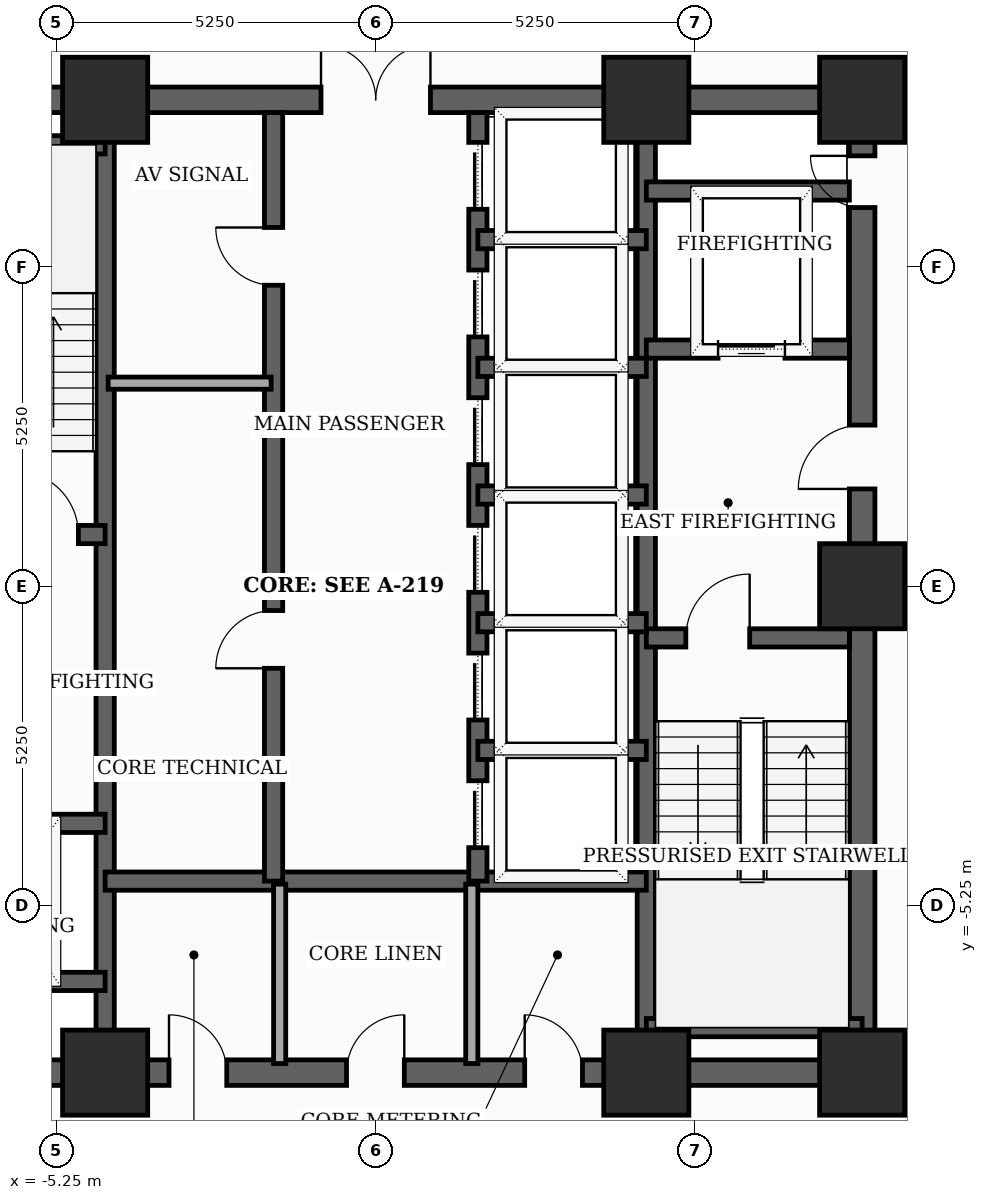
"""IFC4 building model, lengths in metres.
Left out: names, types, materials, properties, quantities, classifications, styles, units other than length and angle.
Written with IfcOpenShell. Run it as: python <this file> out.ifc"""

import sys

from ifc_helpers import new_model, si_unit, direction, frame, frame_2d, origin, origin_2d, place, context, subcontext, project, spatial, rectangle, extrude, element, fill, save


model = new_model("IFC4")
c1 = context("Model", 3, precision=1e-05, world=origin(), true_north=direction((0.0, 1.0)))
c2 = subcontext(c1, "Body", "Model", "MODEL_VIEW")
j1 = project(units=[si_unit("LENGTHUNIT", "METRE"), si_unit("PLANEANGLEUNIT", "RADIAN")], contexts=[c1])
p1 = place(None, origin())
s1 = spatial("IfcSite", under=j1, at=p1, CompositionType="ELEMENT")
p2 = place(p1, origin())
s2 = spatial("IfcBuilding", under=s1, at=p2, CompositionType="ELEMENT")
p3 = place(p2, frame((0.0, 0.0, 173.1)))
s3 = spatial("IfcBuildingStorey", under=s2, at=p3, CompositionType="ELEMENT", Elevation=173.1)
for number, where, z_axis, x_axis in (
    (1, (-4.45, -8.0, 0.0), (0.0, 0.0, 1.0), (1.0, 0.0, 0.0)),
    (2, (4.45, -8.0, 0.0), (0.0, 0.0, 1.0), (1.0, 0.0, 0.0)),
    (3, (8.0, -8.0, 0.0), (0.0, 0.0, 1.0), (1.0, 0.0, 0.0)),
    (4, (8.0, 0.0, 0.0), (0.0, 0.0, 1.0), (1.0, 0.0, 0.0)),
    (5, (8.0, 8.0, 0.0), (0.0, 0.0, 1.0), (1.0, 0.0, 0.0)),
    (6, (4.45, 8.0, 0.0), (0.0, 0.0, 1.0), (1.0, 0.0, 0.0)),
    (7, (-4.45, 8.0, 0.0), (0.0, 0.0, 1.0), (1.0, 0.0, 0.0)),
):
    element("IfcColumn", number, at=place(p3, frame(where, z_axis=z_axis, x_axis=x_axis)), inside=s3, PredefinedType="COLUMN", context=c2, shape_type="SweptSolid", body=[
        extrude(rectangle(XDim=1.4, YDim=1.4, at=origin_2d()), origin(), (0.0, 0.0, 1.0), 3.7),
    ])
p4 = place(p3, frame((8.0, -8.0, 0.0), z_axis=(0.0, 0.0, 1.0), x_axis=(0.0, 1.0, 0.0)))
e8 = element("IfcWall", 8, at=p4, inside=s3, PredefinedType="SHEAR", context=c2, shape_type="SweptSolid", body=[
    extrude(rectangle(XDim=16.0, YDim=0.42, at=frame_2d((8.0, 0.0))), origin(), (0.0, 0.0, 1.0), 3.5),
])
p5 = place(p4, frame((9.6, 0.0, 0.0)))
e9 = element("IfcOpeningElement", 9, at=p5, cuts=e8, PredefinedType="OPENING", context=c2, shape_type="SweptSolid", body=[
    extrude(rectangle(XDim=1.05, YDim=2.15, at=frame_2d((0.525, 1.075))), frame((0.0, 0.22, 0.0), z_axis=(0.0, -1.0, 0.0), x_axis=(1.0, 0.0, 0.0)), (0.0, 0.0, 1.0), 0.44),
])
p6 = place(p4, frame((14.229, 0.0, 0.0)))
e10 = element("IfcOpeningElement", 10, at=p6, cuts=e8, PredefinedType="OPENING", context=c2, shape_type="SweptSolid", body=[
    extrude(rectangle(XDim=0.85, YDim=2.02, at=frame_2d((0.425, 1.01))), frame((0.0, 0.22, 0.0), z_axis=(0.0, -1.0, 0.0), x_axis=(1.0, 0.0, 0.0)), (0.0, 0.0, 1.0), 0.44),
])
p7 = place(p3, frame((-8.0, -8.0, 0.0), z_axis=(0.0, 0.0, 1.0), x_axis=(1.0, 0.0, 0.0)))
e11 = element("IfcWall", 11, at=p7, inside=s3, PredefinedType="SHEAR", context=c2, shape_type="SweptSolid", body=[
    extrude(rectangle(XDim=16.0, YDim=0.42, at=frame_2d((8.0, 0.0))), origin(), (0.0, 0.0, 1.0), 3.5),
])
p8 = place(p7, frame((4.6, 0.0, 0.0)))
e12 = element("IfcOpeningElement", 12, at=p8, cuts=e11, PredefinedType="OPENING", context=c2, shape_type="SweptSolid", body=[
    extrude(rectangle(XDim=0.95, YDim=2.1, at=frame_2d((0.475, 1.05))), frame((0.0, 0.22, 0.0), z_axis=(0.0, -1.0, 0.0), x_axis=(1.0, 0.0, 0.0)), (0.0, 0.0, 1.0), 0.44),
])
p9 = place(p7, frame((7.52, 0.0, 0.0)))
e13 = element("IfcOpeningElement", 13, at=p9, cuts=e11, PredefinedType="OPENING", context=c2, shape_type="SweptSolid", body=[
    extrude(rectangle(XDim=0.95, YDim=2.1, at=frame_2d((0.475, 1.05))), frame((0.0, 0.22, 0.0), z_axis=(0.0, -1.0, 0.0), x_axis=(1.0, 0.0, 0.0)), (0.0, 0.0, 1.0), 0.44),
])
p10 = place(p7, frame((10.45, 0.0, 0.0)))
e14 = element("IfcOpeningElement", 14, at=p10, cuts=e11, PredefinedType="OPENING", context=c2, shape_type="SweptSolid", body=[
    extrude(rectangle(XDim=0.95, YDim=2.1, at=frame_2d((0.475, 1.05))), frame((0.0, 0.22, 0.0), z_axis=(0.0, -1.0, 0.0), x_axis=(1.0, 0.0, 0.0)), (0.0, 0.0, 1.0), 0.44),
])
p11 = place(p3, frame((-8.0, 8.0, 0.0), z_axis=(0.0, 0.0, 1.0), x_axis=(1.0, 0.0, 0.0)))
e15 = element("IfcWall", 15, at=p11, inside=s3, PredefinedType="SHEAR", context=c2, shape_type="SweptSolid", body=[
    extrude(rectangle(XDim=16.0, YDim=0.42, at=frame_2d((8.0, 0.0))), origin(), (0.0, 0.0, 1.0), 3.5),
])
p12 = place(p11, frame((7.1, 0.0, 0.0)))
e16 = element("IfcOpeningElement", 16, at=p12, cuts=e15, PredefinedType="OPENING", context=c2, shape_type="SweptSolid", body=[
    extrude(rectangle(XDim=1.8, YDim=2.15, at=frame_2d((0.9, 1.075))), frame((0.0, 0.22, 0.0), z_axis=(0.0, -1.0, 0.0), x_axis=(1.0, 0.0, 0.0)), (0.0, 0.0, 1.0), 0.44),
])
for number, where, z_axis, x_axis in (
    (17, (-4.45, -7.79, 0.0), (0.0, 0.0, 1.0), (0.0, 1.0, 0.0)),
    (18, (4.45, -7.79, 0.0), (0.0, 0.0, 1.0), (0.0, 1.0, 0.0)),
):
    element("IfcWall", number, at=place(p3, frame(where, z_axis=z_axis, x_axis=x_axis)), inside=s3, PredefinedType="SHEAR", context=c2, shape_type="SweptSolid", body=[
        extrude(rectangle(XDim=15.58, YDim=0.3, at=frame_2d((7.79, 0.0))), origin(), (0.0, 0.0, 1.0), 3.5),
    ])
p13 = place(p3, frame((-7.79, 0.85, 0.0), z_axis=(0.0, 0.0, 1.0), x_axis=(1.0, 0.0, 0.0)))
e19 = element("IfcWall", 19, at=p13, inside=s3, PredefinedType="SHEAR", context=c2, shape_type="SweptSolid", body=[
    extrude(rectangle(XDim=3.34, YDim=0.3, at=frame_2d((1.67, 0.0))), origin(), (0.0, 0.0, 1.0), 3.5),
])
p14 = place(p13, frame((1.85, 0.0, 0.0)))
e20 = element("IfcOpeningElement", 20, at=p14, cuts=e19, PredefinedType="OPENING", context=c2, shape_type="SweptSolid", body=[
    extrude(rectangle(XDim=1.05, YDim=2.15, at=frame_2d((0.525, 1.075))), frame((0.0, 0.16, 0.0), z_axis=(0.0, -1.0, 0.0), x_axis=(1.0, 0.0, 0.0)), (0.0, 0.0, 1.0), 0.32),
])
p15 = place(p3, frame((-7.79, 7.26, 0.0), z_axis=(0.0, 0.0, 1.0), x_axis=(1.0, 0.0, 0.0)))
e21 = element("IfcWall", 21, at=p15, inside=s3, PredefinedType="SHEAR", context=c2, shape_type="SweptSolid", body=[
    extrude(rectangle(XDim=3.34, YDim=0.3, at=frame_2d((1.67, 0.0))), origin(), (0.0, 0.0, 1.0), 3.5),
])
p16 = place(p3, frame((4.45, -0.85, 0.0), z_axis=(0.0, 0.0, 1.0), x_axis=(1.0, 0.0, 0.0)))
e22 = element("IfcWall", 22, at=p16, inside=s3, PredefinedType="SHEAR", context=c2, shape_type="SweptSolid", body=[
    extrude(rectangle(XDim=3.34, YDim=0.3, at=frame_2d((1.67, 0.0))), origin(), (0.0, 0.0, 1.0), 3.5),
])
p17 = place(p16, frame((0.65, 0.0, 0.0)))
e23 = element("IfcOpeningElement", 23, at=p17, cuts=e22, PredefinedType="OPENING", context=c2, shape_type="SweptSolid", body=[
    extrude(rectangle(XDim=1.05, YDim=2.15, at=frame_2d((0.525, 1.075))), frame((0.0, 0.16, 0.0), z_axis=(0.0, -1.0, 0.0), x_axis=(1.0, 0.0, 0.0)), (0.0, 0.0, 1.0), 0.32),
])
p18 = place(p3, frame((4.45, -7.26, 0.0), z_axis=(0.0, 0.0, 1.0), x_axis=(1.0, 0.0, 0.0)))
e24 = element("IfcWall", 24, at=p18, inside=s3, PredefinedType="SHEAR", context=c2, shape_type="SweptSolid", body=[
    extrude(rectangle(XDim=3.55, YDim=0.3, at=frame_2d((1.775, 0.0))), origin(), (0.0, 0.0, 1.0), 3.5),
])
p19 = place(p3, frame((-7.79, -3.9, 0.0), z_axis=(0.0, 0.0, 1.0), x_axis=(1.0, 0.0, 0.0)))
e25 = element("IfcWall", 25, at=p19, inside=s3, PredefinedType="SHEAR", context=c2, shape_type="SweptSolid", body=[
    extrude(rectangle(XDim=3.34, YDim=0.3, at=frame_2d((1.67, 0.0))), origin(), (0.0, 0.0, 1.0), 3.5),
])
p20 = place(p19, frame((1.27, 0.0, 0.0)))
e26 = element("IfcOpeningElement", 26, at=p20, cuts=e25, PredefinedType="OPENING", context=c2, shape_type="SweptSolid", body=[
    extrude(rectangle(XDim=1.1, YDim=2.1, at=frame_2d((0.55, 1.05))), frame((0.0, 0.16, 0.0), z_axis=(0.0, -1.0, 0.0), x_axis=(1.0, 0.0, 0.0)), (0.0, 0.0, 1.0), 0.32),
])
p21 = place(p3, frame((-7.79, -6.5, 0.0), z_axis=(0.0, 0.0, 1.0), x_axis=(1.0, 0.0, 0.0)))
e27 = element("IfcWall", 27, at=p21, inside=s3, PredefinedType="SHEAR", context=c2, shape_type="SweptSolid", body=[
    extrude(rectangle(XDim=3.34, YDim=0.3, at=frame_2d((1.67, 0.0))), origin(), (0.0, 0.0, 1.0), 3.5),
])
p22 = place(p3, frame((4.45, 3.9, 0.0), z_axis=(0.0, 0.0, 1.0), x_axis=(1.0, 0.0, 0.0)))
e28 = element("IfcWall", 28, at=p22, inside=s3, PredefinedType="SHEAR", context=c2, shape_type="SweptSolid", body=[
    extrude(rectangle(XDim=3.34, YDim=0.3, at=frame_2d((1.67, 0.0))), origin(), (0.0, 0.0, 1.0), 3.5),
])
p23 = place(p22, frame((1.18, 0.0, 0.0)))
e29 = element("IfcOpeningElement", 29, at=p23, cuts=e28, PredefinedType="OPENING", context=c2, shape_type="SweptSolid", body=[
    extrude(rectangle(XDim=1.1, YDim=2.1, at=frame_2d((0.55, 1.05))), frame((0.0, 0.16, 0.0), z_axis=(0.0, -1.0, 0.0), x_axis=(1.0, 0.0, 0.0)), (0.0, 0.0, 1.0), 0.32),
])
p24 = place(p3, frame((4.45, 6.5, 0.0), z_axis=(0.0, 0.0, 1.0), x_axis=(1.0, 0.0, 0.0)))
e30 = element("IfcWall", 30, at=p24, inside=s3, PredefinedType="SHEAR", context=c2, shape_type="SweptSolid", body=[
    extrude(rectangle(XDim=3.34, YDim=0.3, at=frame_2d((1.67, 0.0))), origin(), (0.0, 0.0, 1.0), 3.5),
])
p25 = place(p3, frame((-4.45, -4.85, 0.0), z_axis=(0.0, 0.0, 1.0), x_axis=(1.0, 0.0, 0.0)))
e31 = element("IfcWall", 31, at=p25, inside=s3, PredefinedType="SHEAR", context=c2, shape_type="SweptSolid", body=[
    extrude(rectangle(XDim=8.9, YDim=0.3, at=frame_2d((4.45, 0.0))), origin(), (0.0, 0.0, 1.0), 3.5),
])
p26 = place(p3, frame((-1.68, -4.85, 0.0), z_axis=(0.0, 0.0, 1.0), x_axis=(0.0, 1.0, 0.0)))
e32 = element("IfcWall", 32, at=p26, inside=s3, PredefinedType="SHEAR", context=c2, shape_type="SweptSolid", body=[
    extrude(rectangle(XDim=12.64, YDim=0.3, at=frame_2d((6.32, 0.0))), origin(), (0.0, 0.0, 1.0), 3.5),
])
p27 = place(p26, frame((3.5, 0.0, 0.0)))
e33 = element("IfcOpeningElement", 33, at=p27, cuts=e32, PredefinedType="OPENING", context=c2, shape_type="SweptSolid", body=[
    extrude(rectangle(XDim=0.95, YDim=2.1, at=frame_2d((0.475, 1.05))), frame((0.0, 0.16, 0.0), z_axis=(0.0, -1.0, 0.0), x_axis=(1.0, 0.0, 0.0)), (0.0, 0.0, 1.0), 0.32),
])
p28 = place(p26, frame((9.8, 0.0, 0.0)))
e34 = element("IfcOpeningElement", 34, at=p28, cuts=e32, PredefinedType="OPENING", context=c2, shape_type="SweptSolid", body=[
    extrude(rectangle(XDim=0.95, YDim=2.1, at=frame_2d((0.475, 1.05))), frame((0.0, 0.16, 0.0), z_axis=(0.0, -1.0, 0.0), x_axis=(1.0, 0.0, 0.0)), (0.0, 0.0, 1.0), 0.32),
])
p29 = place(p3, frame((1.68, -4.85, 0.0), z_axis=(0.0, 0.0, 1.0), x_axis=(0.0, 1.0, 0.0)))
e35 = element("IfcWall", 35, at=p29, inside=s3, PredefinedType="SHEAR", context=c2, shape_type="SweptSolid", body=[
    extrude(rectangle(XDim=12.64, YDim=0.3, at=frame_2d((6.32, 0.0))), origin(), (0.0, 0.0, 1.0), 3.5),
])
p30 = place(p29, frame((0.55, 0.0, 0.0)))
e36 = element("IfcOpeningElement", 36, at=p30, cuts=e35, PredefinedType="OPENING", context=c2, shape_type="SweptSolid", body=[
    extrude(rectangle(XDim=1.1, YDim=2.1, at=frame_2d((0.55, 1.05))), frame((0.0, 0.16, 0.0), z_axis=(0.0, -1.0, 0.0), x_axis=(1.0, 0.0, 0.0)), (0.0, 0.0, 1.0), 0.32),
])
p31 = place(p29, frame((2.65, 0.0, 0.0)))
e37 = element("IfcOpeningElement", 37, at=p31, cuts=e35, PredefinedType="OPENING", context=c2, shape_type="SweptSolid", body=[
    extrude(rectangle(XDim=1.1, YDim=2.1, at=frame_2d((0.55, 1.05))), frame((0.0, 0.16, 0.0), z_axis=(0.0, -1.0, 0.0), x_axis=(1.0, 0.0, 0.0)), (0.0, 0.0, 1.0), 0.32),
])
p32 = place(p29, frame((4.75, 0.0, 0.0)))
e38 = element("IfcOpeningElement", 38, at=p32, cuts=e35, PredefinedType="OPENING", context=c2, shape_type="SweptSolid", body=[
    extrude(rectangle(XDim=1.1, YDim=2.1, at=frame_2d((0.55, 1.05))), frame((0.0, 0.16, 0.0), z_axis=(0.0, -1.0, 0.0), x_axis=(1.0, 0.0, 0.0)), (0.0, 0.0, 1.0), 0.32),
])
p33 = place(p29, frame((6.85, 0.0, 0.0)))
e39 = element("IfcOpeningElement", 39, at=p33, cuts=e35, PredefinedType="OPENING", context=c2, shape_type="SweptSolid", body=[
    extrude(rectangle(XDim=1.1, YDim=2.1, at=frame_2d((0.55, 1.05))), frame((0.0, 0.16, 0.0), z_axis=(0.0, -1.0, 0.0), x_axis=(1.0, 0.0, 0.0)), (0.0, 0.0, 1.0), 0.32),
])
p34 = place(p29, frame((8.95, 0.0, 0.0)))
e40 = element("IfcOpeningElement", 40, at=p34, cuts=e35, PredefinedType="OPENING", context=c2, shape_type="SweptSolid", body=[
    extrude(rectangle(XDim=1.1, YDim=2.1, at=frame_2d((0.55, 1.05))), frame((0.0, 0.16, 0.0), z_axis=(0.0, -1.0, 0.0), x_axis=(1.0, 0.0, 0.0)), (0.0, 0.0, 1.0), 0.32),
])
p35 = place(p29, frame((11.05, 0.0, 0.0)))
e41 = element("IfcOpeningElement", 41, at=p35, cuts=e35, PredefinedType="OPENING", context=c2, shape_type="SweptSolid", body=[
    extrude(rectangle(XDim=1.1, YDim=2.1, at=frame_2d((0.55, 1.05))), frame((0.0, 0.16, 0.0), z_axis=(0.0, -1.0, 0.0), x_axis=(1.0, 0.0, 0.0)), (0.0, 0.0, 1.0), 0.32),
])
for number, where, z_axis, x_axis in (
    (42, (1.68, 1.5, 0.0), (0.0, 0.0, 1.0), (1.0, 0.0, 0.0)),
    (43, (1.68, 3.6, 0.0), (0.0, 0.0, 1.0), (1.0, 0.0, 0.0)),
    (44, (1.68, 5.7, 0.0), (0.0, 0.0, 1.0), (1.0, 0.0, 0.0)),
    (45, (1.68, -2.7, 0.0), (0.0, 0.0, 1.0), (1.0, 0.0, 0.0)),
    (46, (1.68, -0.6, 0.0), (0.0, 0.0, 1.0), (1.0, 0.0, 0.0)),
):
    element("IfcWall", number, at=place(p3, frame(where, z_axis=z_axis, x_axis=x_axis)), inside=s3, PredefinedType="SHEAR", context=c2, shape_type="SweptSolid", body=[
        extrude(rectangle(XDim=2.77, YDim=0.3, at=frame_2d((1.385, 0.0))), origin(), (0.0, 0.0, 1.0), 3.5),
    ])
for number, where, z_axis, x_axis in (
    (47, (-1.58, -7.85, 0.0), (0.0, 0.0, 1.0), (0.0, 1.0, 0.0)),
    (48, (1.58, -7.85, 0.0), (0.0, 0.0, 1.0), (0.0, 1.0, 0.0)),
):
    element("IfcWall", number, at=place(p3, frame(where, z_axis=z_axis, x_axis=x_axis)), inside=s3, PredefinedType="SOLIDWALL", context=c2, shape_type="SweptSolid", body=[
        extrude(rectangle(XDim=2.95, YDim=0.2, at=frame_2d((1.475, 0.0))), origin(), (0.0, 0.0, 1.0), 2.885),
    ])
p36 = place(p3, frame((-4.4, 3.34, 0.0), z_axis=(0.0, 0.0, 1.0), x_axis=(1.0, 0.0, 0.0)))
e49 = element("IfcWall", 49, at=p36, inside=s3, PredefinedType="SOLIDWALL", context=c2, shape_type="SweptSolid", body=[
    extrude(rectangle(XDim=2.68, YDim=0.2, at=frame_2d((1.34, 0.0))), origin(), (0.0, 0.0, 1.0), 3.5),
])
p37 = place(p5, origin())
e50 = element("IfcDoor", 50, at=p37, inside=s3, OperationType="SINGLE_SWING_LEFT", PredefinedType="DOOR", context=c2, shape_type="SweptSolid", body=[
    extrude(rectangle(XDim=1.05, YDim=2.15, at=frame_2d((0.525, 1.075))), frame((0.0, 0.025, 0.0), z_axis=(0.0, -1.0, 0.0), x_axis=(1.0, 0.0, 0.0)), (0.0, 0.0, 1.0), 0.05),
])
fill(e9, e50)
p38 = place(p6, origin())
e51 = element("IfcDoor", 51, at=p38, inside=s3, OperationType="SINGLE_SWING_RIGHT", PredefinedType="TRAPDOOR", context=c2, shape_type="SweptSolid", body=[
    extrude(rectangle(XDim=0.85, YDim=2.02, at=frame_2d((0.425, 1.01))), frame((0.0, 0.025, 0.0), z_axis=(0.0, -1.0, 0.0), x_axis=(1.0, 0.0, 0.0)), (0.0, 0.0, 1.0), 0.05),
])
fill(e10, e51)
p39 = place(p8, origin())
e52 = element("IfcDoor", 52, at=p39, inside=s3, OperationType="SINGLE_SWING_LEFT", PredefinedType="DOOR", context=c2, shape_type="SweptSolid", body=[
    extrude(rectangle(XDim=0.95, YDim=2.1, at=frame_2d((0.475, 1.05))), frame((0.0, 0.025, 0.0), z_axis=(0.0, -1.0, 0.0), x_axis=(1.0, 0.0, 0.0)), (0.0, 0.0, 1.0), 0.05),
])
fill(e12, e52)
p40 = place(p9, origin())
e53 = element("IfcDoor", 53, at=p40, inside=s3, OperationType="SINGLE_SWING_RIGHT", PredefinedType="DOOR", context=c2, shape_type="SweptSolid", body=[
    extrude(rectangle(XDim=0.95, YDim=2.1, at=frame_2d((0.475, 1.05))), frame((0.0, 0.025, 0.0), z_axis=(0.0, -1.0, 0.0), x_axis=(1.0, 0.0, 0.0)), (0.0, 0.0, 1.0), 0.05),
])
fill(e13, e53)
p41 = place(p10, origin())
e54 = element("IfcDoor", 54, at=p41, inside=s3, OperationType="SINGLE_SWING_LEFT", PredefinedType="DOOR", context=c2, shape_type="SweptSolid", body=[
    extrude(rectangle(XDim=0.95, YDim=2.1, at=frame_2d((0.475, 1.05))), frame((0.0, 0.025, 0.0), z_axis=(0.0, -1.0, 0.0), x_axis=(1.0, 0.0, 0.0)), (0.0, 0.0, 1.0), 0.05),
])
fill(e14, e54)
p42 = place(p12, origin())
e55 = element("IfcDoor", 55, at=p42, inside=s3, OperationType="DOUBLE_DOOR_SINGLE_SWING", PredefinedType="DOOR", context=c2, shape_type="SweptSolid", body=[
    extrude(rectangle(XDim=1.8, YDim=2.15, at=frame_2d((0.9, 1.075))), frame((0.0, 0.025, 0.0), z_axis=(0.0, -1.0, 0.0), x_axis=(1.0, 0.0, 0.0)), (0.0, 0.0, 1.0), 0.05),
])
fill(e16, e55)
p43 = place(p14, origin())
e56 = element("IfcDoor", 56, at=p43, inside=s3, OperationType="SINGLE_SWING_LEFT", PredefinedType="DOOR", context=c2, shape_type="SweptSolid", body=[
    extrude(rectangle(XDim=1.05, YDim=2.15, at=frame_2d((0.525, 1.075))), frame((0.0, 0.025, 0.0), z_axis=(0.0, -1.0, 0.0), x_axis=(1.0, 0.0, 0.0)), (0.0, 0.0, 1.0), 0.05),
])
fill(e20, e56)
p44 = place(p17, origin())
e57 = element("IfcDoor", 57, at=p44, inside=s3, OperationType="SINGLE_SWING_RIGHT", PredefinedType="DOOR", context=c2, shape_type="SweptSolid", body=[
    extrude(rectangle(XDim=1.05, YDim=2.15, at=frame_2d((0.525, 1.075))), frame((0.0, 0.025, 0.0), z_axis=(0.0, -1.0, 0.0), x_axis=(1.0, 0.0, 0.0)), (0.0, 0.0, 1.0), 0.05),
])
fill(e23, e57)
p45 = place(p23, origin())
e58 = element("IfcDoor", 58, at=p45, inside=s3, OperationType="SLIDING_TO_LEFT", PredefinedType="DOOR", context=c2, shape_type="SweptSolid", body=[
    extrude(rectangle(XDim=1.1, YDim=2.1, at=frame_2d((0.55, 1.05))), frame((0.0, 0.025, 0.0), z_axis=(0.0, -1.0, 0.0), x_axis=(1.0, 0.0, 0.0)), (0.0, 0.0, 1.0), 0.05),
])
fill(e29, e58)
p46 = place(p27, origin())
e59 = element("IfcDoor", 59, at=p46, inside=s3, OperationType="SINGLE_SWING_LEFT", PredefinedType="DOOR", context=c2, shape_type="SweptSolid", body=[
    extrude(rectangle(XDim=0.95, YDim=2.1, at=frame_2d((0.475, 1.05))), frame((0.0, 0.025, 0.0), z_axis=(0.0, -1.0, 0.0), x_axis=(1.0, 0.0, 0.0)), (0.0, 0.0, 1.0), 0.05),
])
fill(e33, e59)
p47 = place(p28, origin())
e60 = element("IfcDoor", 60, at=p47, inside=s3, OperationType="SINGLE_SWING_RIGHT", PredefinedType="DOOR", context=c2, shape_type="SweptSolid", body=[
    extrude(rectangle(XDim=0.95, YDim=2.1, at=frame_2d((0.475, 1.05))), frame((0.0, 0.025, 0.0), z_axis=(0.0, -1.0, 0.0), x_axis=(1.0, 0.0, 0.0)), (0.0, 0.0, 1.0), 0.05),
])
fill(e34, e60)
p48 = place(p30, origin())
e61 = element("IfcDoor", 61, at=p48, inside=s3, OperationType="SLIDING_TO_LEFT", PredefinedType="DOOR", context=c2, shape_type="SweptSolid", body=[
    extrude(rectangle(XDim=1.1, YDim=2.1, at=frame_2d((0.55, 1.05))), frame((0.0, 0.025, 0.0), z_axis=(0.0, -1.0, 0.0), x_axis=(1.0, 0.0, 0.0)), (0.0, 0.0, 1.0), 0.05),
])
fill(e36, e61)
p49 = place(p31, origin())
e62 = element("IfcDoor", 62, at=p49, inside=s3, OperationType="SLIDING_TO_LEFT", PredefinedType="DOOR", context=c2, shape_type="SweptSolid", body=[
    extrude(rectangle(XDim=1.1, YDim=2.1, at=frame_2d((0.55, 1.05))), frame((0.0, 0.025, 0.0), z_axis=(0.0, -1.0, 0.0), x_axis=(1.0, 0.0, 0.0)), (0.0, 0.0, 1.0), 0.05),
])
fill(e37, e62)
p50 = place(p32, origin())
e63 = element("IfcDoor", 63, at=p50, inside=s3, OperationType="SLIDING_TO_LEFT", PredefinedType="DOOR", context=c2, shape_type="SweptSolid", body=[
    extrude(rectangle(XDim=1.1, YDim=2.1, at=frame_2d((0.55, 1.05))), frame((0.0, 0.025, 0.0), z_axis=(0.0, -1.0, 0.0), x_axis=(1.0, 0.0, 0.0)), (0.0, 0.0, 1.0), 0.05),
])
fill(e38, e63)
p51 = place(p33, origin())
e64 = element("IfcDoor", 64, at=p51, inside=s3, OperationType="SLIDING_TO_LEFT", PredefinedType="DOOR", context=c2, shape_type="SweptSolid", body=[
    extrude(rectangle(XDim=1.1, YDim=2.1, at=frame_2d((0.55, 1.05))), frame((0.0, 0.025, 0.0), z_axis=(0.0, -1.0, 0.0), x_axis=(1.0, 0.0, 0.0)), (0.0, 0.0, 1.0), 0.05),
])
fill(e39, e64)
p52 = place(p34, origin())
e65 = element("IfcDoor", 65, at=p52, inside=s3, OperationType="SLIDING_TO_LEFT", PredefinedType="DOOR", context=c2, shape_type="SweptSolid", body=[
    extrude(rectangle(XDim=1.1, YDim=2.1, at=frame_2d((0.55, 1.05))), frame((0.0, 0.025, 0.0), z_axis=(0.0, -1.0, 0.0), x_axis=(1.0, 0.0, 0.0)), (0.0, 0.0, 1.0), 0.05),
])
fill(e40, e65)
p53 = place(p35, origin())
e66 = element("IfcDoor", 66, at=p53, inside=s3, OperationType="SLIDING_TO_LEFT", PredefinedType="DOOR", context=c2, shape_type="SweptSolid", body=[
    extrude(rectangle(XDim=1.1, YDim=2.1, at=frame_2d((0.55, 1.05))), frame((0.0, 0.025, 0.0), z_axis=(0.0, -1.0, 0.0), x_axis=(1.0, 0.0, 0.0)), (0.0, 0.0, 1.0), 0.05),
])
fill(e41, e66)
save(model, sys.argv[1])
